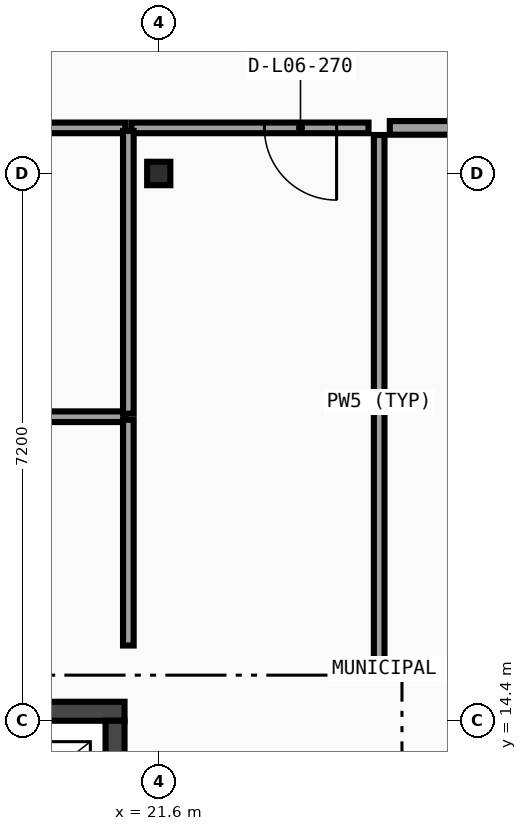
"""IFC4 building model, lengths in metres.
Left out: names, types, materials, properties, quantities, classifications, styles, units other than length and angle.
Written with IfcOpenShell. Run it as: python <this file> out.ifc"""

import sys

from ifc_helpers import new_model, si_unit, direction, frame, frame_2d, origin, origin_2d, place, context, subcontext, project, spatial, rectangle, i_section, extrude, element, fill, save


model = new_model("IFC4")
c1 = context("Model", 3, precision=1e-05, world=origin(), true_north=direction((0.0, 1.0)))
c2 = subcontext(c1, "Body", "Model", "MODEL_VIEW")
j1 = project(units=[si_unit("LENGTHUNIT", "METRE"), si_unit("PLANEANGLEUNIT", "RADIAN")], contexts=[c1])
p1 = place(None, origin())
s1 = spatial("IfcSite", under=j1, at=p1, CompositionType="ELEMENT")
p2 = place(p1, origin())
s2 = spatial("IfcBuilding", under=s1, at=p2, CompositionType="ELEMENT")
p3 = place(p2, frame((0.0, 0.0, 27.0)))
s3 = spatial("IfcBuildingStorey", under=s2, at=p3, CompositionType="ELEMENT", Elevation=27.0)
p4 = place(p3, frame((21.6, 21.6, 0.0), z_axis=(0.0, 0.0, 1.0), x_axis=(1.0, 0.0, 0.0)))
e1 = element("IfcColumn", 1, at=p4, inside=s3, PredefinedType="COLUMN", context=c2, shape_type="SweptSolid", body=[
    extrude(i_section(OverallWidth=0.305, OverallDepth=0.308, WebThickness=0.01, FlangeThickness=0.015, FilletRadius=0.015, at=origin_2d()), origin(), (0.0, 0.0, 1.0), 4.05),
])
p5 = place(p3, frame((21.15, 14.525, 0.0), z_axis=(0.0, 0.0, 1.0), x_axis=(-1.0, 0.0, 0.0)))
e2 = element("IfcWall", 2, at=p5, inside=s3, PredefinedType="SHEAR", context=c2, shape_type="SweptSolid", body=[
    extrude(rectangle(XDim=3.0, YDim=0.25, at=frame_2d((1.5, 0.0))), origin(), (0.0, 0.0, 1.0), 3.8),
])
p6 = place(p3, frame((21.025, 12.2, 0.0), z_axis=(0.0, 0.0, 1.0), x_axis=(0.0, 1.0, 0.0)))
e3 = element("IfcWall", 3, at=p6, inside=s3, PredefinedType="SHEAR", context=c2, shape_type="SweptSolid", body=[
    extrude(rectangle(XDim=2.2, YDim=0.25, at=frame_2d((1.1, 0.0))), origin(), (0.0, 0.0, 1.0), 3.8),
])
p7 = place(p3, frame((24.64, 22.2, 0.0), z_axis=(0.0, 0.0, 1.0), x_axis=(1.0, 0.0, 0.0)))
e4 = element("IfcWall", 4, at=p7, inside=s3, PredefinedType="PARTITIONING", context=c2, shape_type="SweptSolid", body=[
    extrude(rectangle(XDim=3.52, YDim=0.18, at=frame_2d((1.76, 0.0))), origin(), (0.0, 0.0, 1.0), 3.8),
])
p8 = place(p3, frame((17.44, 22.2, 0.0), z_axis=(0.0, 0.0, 1.0), x_axis=(1.0, 0.0, 0.0)))
e5 = element("IfcWall", 5, at=p8, inside=s3, PredefinedType="PARTITIONING", context=c2, shape_type="SweptSolid", body=[
    extrude(rectangle(XDim=3.72, YDim=0.14, at=frame_2d((1.86, 0.0))), origin(), (0.0, 0.0, 1.0), 3.8),
])
p9 = place(p8, frame((0.42, 0.0, 0.0)))
e6 = element("IfcOpeningElement", 6, at=p9, cuts=e5, PredefinedType="OPENING", context=c2, shape_type="SweptSolid", body=[
    extrude(rectangle(XDim=0.95, YDim=2.08, at=frame_2d((0.475, 1.04))), frame((0.0, 0.08, 0.0), z_axis=(0.0, -1.0, 0.0), x_axis=(1.0, 0.0, 0.0)), (0.0, 0.0, 1.0), 0.16),
])
p10 = place(p3, frame((21.24, 22.2, 0.0), z_axis=(0.0, 0.0, 1.0), x_axis=(1.0, 0.0, 0.0)))
e7 = element("IfcWall", 7, at=p10, inside=s3, PredefinedType="PARTITIONING", context=c2, shape_type="SweptSolid", body=[
    extrude(rectangle(XDim=3.12, YDim=0.14, at=frame_2d((1.56, 0.0))), origin(), (0.0, 0.0, 1.0), 3.246),
])
p11 = place(p10, frame((1.75, 0.0, 0.0)))
e8 = element("IfcOpeningElement", 8, at=p11, cuts=e7, PredefinedType="OPENING", context=c2, shape_type="SweptSolid", body=[
    extrude(rectangle(XDim=0.95, YDim=2.08, at=frame_2d((0.475, 1.04))), frame((0.0, 0.08, 0.0), z_axis=(0.0, -1.0, 0.0), x_axis=(1.0, 0.0, 0.0)), (0.0, 0.0, 1.0), 0.16),
])
p12 = place(p3, frame((24.5, 15.071, 0.0), z_axis=(0.0, 0.0, 1.0), x_axis=(0.0, 1.0, 0.0)))
e9 = element("IfcWall", 9, at=p12, inside=s3, PredefinedType="PARTITIONING", context=c2, shape_type="SweptSolid", body=[
    extrude(rectangle(XDim=7.035, YDim=0.14, at=frame_2d((3.518, 0.0))), origin(), (0.0, 0.0, 1.0), 3.246),
])
p13 = place(p3, frame((17.44, 18.4, 0.0), z_axis=(0.0, 0.0, 1.0), x_axis=(1.0, 0.0, 0.0)))
e10 = element("IfcWall", 10, at=p13, inside=s3, PredefinedType="PARTITIONING", context=c2, shape_type="SweptSolid", body=[
    extrude(rectangle(XDim=3.72, YDim=0.14, at=frame_2d((1.86, 0.0))), origin(), (0.0, 0.0, 1.0), 3.8),
])
p14 = place(p13, frame((0.42, 0.0, 0.0)))
e11 = element("IfcOpeningElement", 11, at=p14, cuts=e10, PredefinedType="OPENING", context=c2, shape_type="SweptSolid", body=[
    extrude(rectangle(XDim=0.95, YDim=2.08, at=frame_2d((0.475, 1.04))), frame((0.0, 0.08, 0.0), z_axis=(0.0, -1.0, 0.0), x_axis=(1.0, 0.0, 0.0)), (0.0, 0.0, 1.0), 0.16),
])
p15 = place(p3, frame((21.2, 15.39, 0.0), z_axis=(0.0, 0.0, 1.0), x_axis=(0.0, 1.0, 0.0)))
e12 = element("IfcWall", 12, at=p15, inside=s3, PredefinedType="PARTITIONING", context=c2, shape_type="SweptSolid", body=[
    extrude(rectangle(XDim=2.97, YDim=0.14, at=frame_2d((1.485, 0.0))), origin(), (0.0, 0.0, 1.0), 3.8),
])
p16 = place(p3, frame((21.2, 18.44, 0.0), z_axis=(0.0, 0.0, 1.0), x_axis=(0.0, 1.0, 0.0)))
e13 = element("IfcWall", 13, at=p16, inside=s3, PredefinedType="PARTITIONING", context=c2, shape_type="SweptSolid", body=[
    extrude(rectangle(XDim=3.72, YDim=0.14, at=frame_2d((1.86, 0.0))), origin(), (0.0, 0.0, 1.0), 3.8),
])
p17 = place(p11, origin())
e14 = element("IfcDoor", 14, at=p17, inside=s3, OperationType="SINGLE_SWING_RIGHT", PredefinedType="DOOR", context=c2, shape_type="SweptSolid", body=[
    extrude(rectangle(XDim=0.95, YDim=2.08, at=frame_2d((0.475, 1.04))), frame((0.0, 0.025, 0.0), z_axis=(0.0, -1.0, 0.0), x_axis=(1.0, 0.0, 0.0)), (0.0, 0.0, 1.0), 0.05),
])
fill(e8, e14)
save(model, sys.argv[1])
